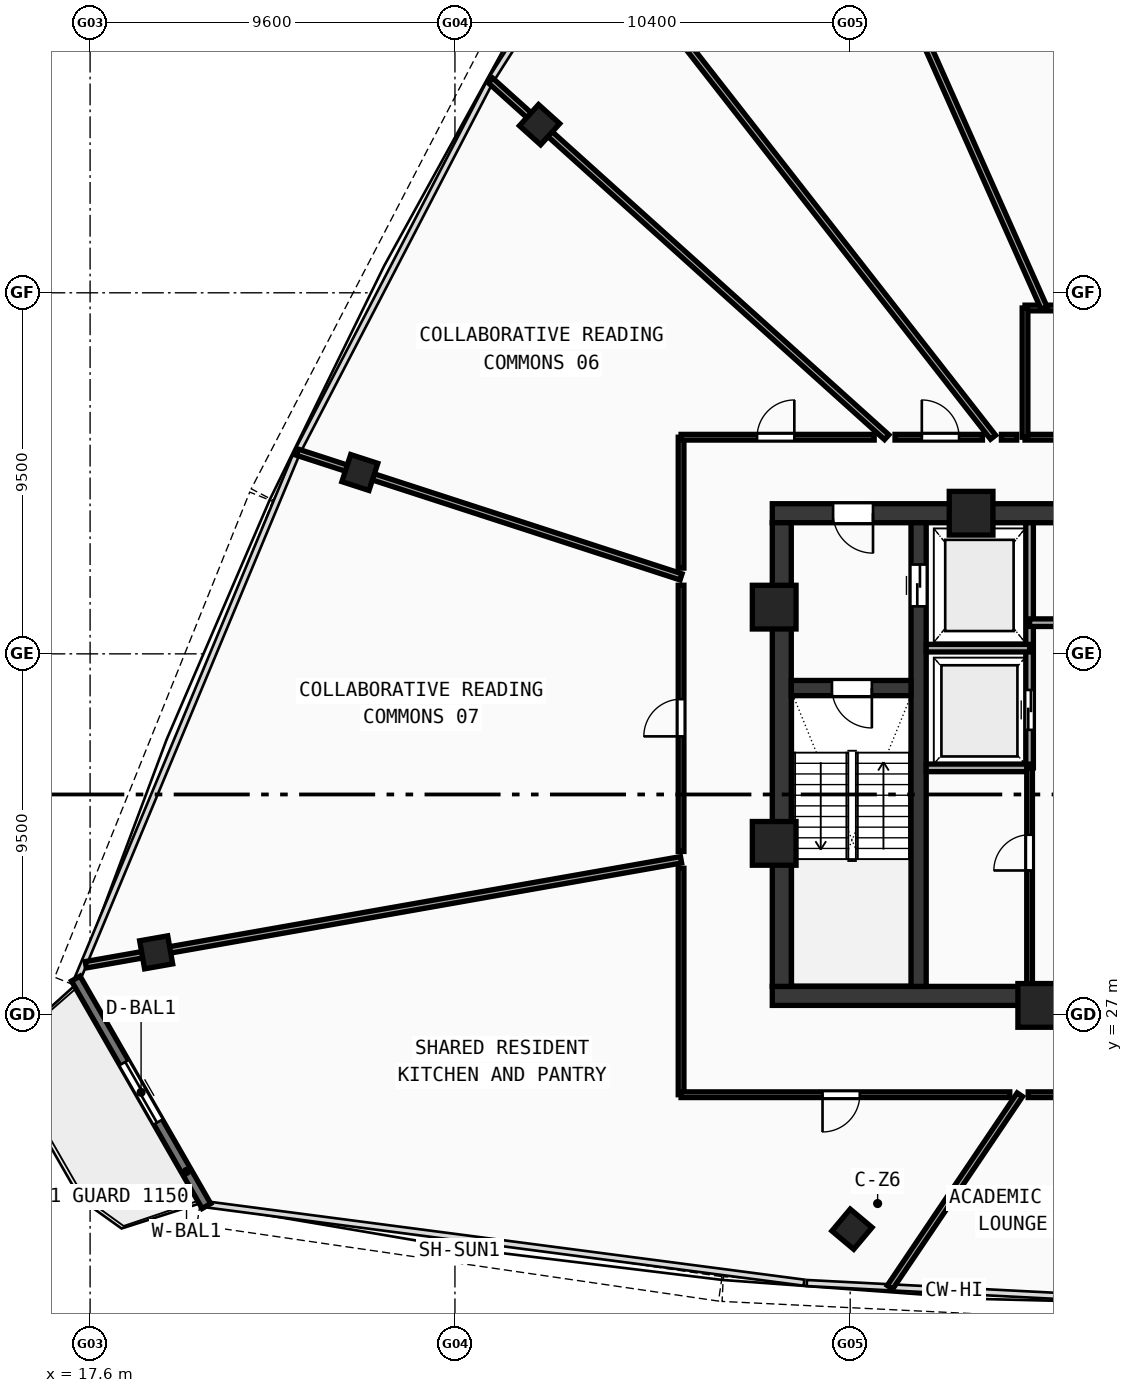
"""IFC4 building model, lengths in metres.
Left out: names, types, materials, properties, quantities, classifications, styles, units other than length and angle.
Written with IfcOpenShell. Run it as: python <this file> out.ifc"""

import sys

from ifc_helpers import new_model, si_unit, direction, frame, frame_2d, origin, origin_with_axes, origin_2d, place, context, subcontext, project, spatial, rectangle, hollow_rectangle, extrude, source, transform, mapped, element, fill, save


model = new_model("IFC4")
c1 = context("Model", 3, precision=1e-05, world=origin(), true_north=direction((0.0, 1.0)))
c2 = subcontext(c1, "Body", "Model", "MODEL_VIEW")
j1 = project(units=[si_unit("LENGTHUNIT", "METRE"), si_unit("PLANEANGLEUNIT", "RADIAN")], contexts=[c1])
p1 = place(None, origin())
s1 = spatial("IfcSite", under=j1, at=p1, CompositionType="ELEMENT")
p2 = place(p1, origin())
s2 = spatial("IfcBuilding", under=s1, at=p2, CompositionType="ELEMENT")
p3 = place(p2, frame((0.0, 0.0, 299.94)))
s3 = spatial("IfcBuildingStorey", under=s2, at=p3, CompositionType="ELEMENT", Elevation=299.94)
p4 = place(p3, frame((35.55, 27.5, 0.0), z_axis=(0.0, 0.0, 1.0), x_axis=(1.0, 0.0, 0.0)))
e1 = element("IfcWall", 1, at=p4, inside=s3, PredefinedType="SHEAR", context=c2, shape_type="SweptSolid", body=[
    extrude(rectangle(XDim=24.9, YDim=0.5, at=frame_2d((12.45, 0.0))), origin(), (0.0, 0.0, 1.0), 3.47),
])
p5 = place(p3, frame((35.55, 40.2, 0.0), z_axis=(0.0, 0.0, 1.0), x_axis=(1.0, 0.0, 0.0)))
e2 = element("IfcWall", 2, at=p5, inside=s3, PredefinedType="SHEAR", context=c2, shape_type="SweptSolid", body=[
    extrude(rectangle(XDim=11.25, YDim=0.5, at=frame_2d((5.625, 0.0))), origin(), (0.0, 0.0, 1.0), 3.47),
])
p6 = place(p5, frame((1.6, 0.0, 0.0)))
e3 = element("IfcOpeningElement", 3, at=p6, cuts=e2, PredefinedType="OPENING", context=c2, shape_type="SweptSolid", body=[
    extrude(rectangle(XDim=1.05, YDim=2.1, at=frame_2d((0.525, 1.05))), frame((0.0, 0.26, 0.0), z_axis=(0.0, -1.0, 0.0), x_axis=(1.0, 0.0, 0.0)), (0.0, 0.0, 1.0), 0.52),
])
p7 = place(p3, frame((35.8, 27.75, 0.0), z_axis=(0.0, 0.0, 1.0), x_axis=(0.0, 1.0, 0.0)))
e4 = element("IfcWall", 4, at=p7, inside=s3, PredefinedType="SHEAR", context=c2, shape_type="SweptSolid", body=[
    extrude(rectangle(XDim=12.2, YDim=0.5, at=frame_2d((6.1, 0.0))), origin(), (0.0, 0.0, 1.0), 3.47),
])
p8 = place(p3, frame((39.4, 27.75, 0.0), z_axis=(0.0, 0.0, 1.0), x_axis=(0.0, 1.0, 0.0)))
e5 = element("IfcWall", 5, at=p8, inside=s3, PredefinedType="SHEAR", context=c2, shape_type="SweptSolid", body=[
    extrude(rectangle(XDim=12.2, YDim=0.4, at=frame_2d((6.1, 0.0))), origin(), (0.0, 0.0, 1.0), 3.47),
])
p9 = place(p8, frame((10.0, 0.0, 0.0)))
e6 = element("IfcOpeningElement", 6, at=p9, cuts=e5, PredefinedType="OPENING", context=c2, shape_type="SweptSolid", body=[
    extrude(rectangle(XDim=1.1, YDim=2.1, at=frame_2d((0.55, 1.05))), frame((0.0, 0.21, 0.0), z_axis=(0.0, -1.0, 0.0), x_axis=(1.0, 0.0, 0.0)), (0.0, 0.0, 1.0), 0.42),
])
p10 = place(p3, frame((36.05, 35.6, 0.0), z_axis=(0.0, 0.0, 1.0), x_axis=(1.0, 0.0, 0.0)))
e7 = element("IfcWall", 7, at=p10, inside=s3, PredefinedType="SHEAR", context=c2, shape_type="SweptSolid", body=[
    extrude(rectangle(XDim=3.15, YDim=0.4, at=frame_2d((1.575, 0.0))), origin(), (0.0, 0.0, 1.0), 3.47),
])
p11 = place(p10, frame((1.07, 0.0, 0.0)))
e8 = element("IfcOpeningElement", 8, at=p11, cuts=e7, PredefinedType="OPENING", context=c2, shape_type="SweptSolid", body=[
    extrude(rectangle(XDim=1.05, YDim=2.1, at=frame_2d((0.525, 1.05))), frame((0.0, 0.21, 0.0), z_axis=(0.0, -1.0, 0.0), x_axis=(1.0, 0.0, 0.0)), (0.0, 0.0, 1.0), 0.42),
])
m1 = source(origin(), c2, "Body", "SweptSolid", [
    extrude(hollow_rectangle(XDim=1.15, YDim=1.15, WallThickness=0.048, at=origin_2d()), origin(), (0.0, 0.0, 1.0), 3.73),
])
for number, where, z_axis, x_axis in (
    (9, (42.588, 27.25, -0.26), (0.0, 0.0, 1.0), (1.0, 0.0, 0.0)),
    (10, (40.781, 40.2, -0.26), (0.0, 0.0, 1.0), (1.0, 0.0, 0.0)),
    (11, (35.6, 37.729, -0.26), (0.0, 0.0, 1.0), (1.0, 0.0, 0.0)),
    (12, (35.6, 31.513, -0.26), (0.0, 0.0, 1.0), (1.0, 0.0, 0.0)),
):
    element("IfcColumn", number, at=place(p3, frame(where, z_axis=z_axis, x_axis=x_axis)), inside=s3, PredefinedType="COLUMN", context=c2, shape_type="MappedRepresentation", body=[
        mapped(m1, transform((0.0, 0.0, 0.0), scale=1.0)),
    ])
m2 = source(origin(), c2, "Body", "SweptSolid", [
    extrude(hollow_rectangle(XDim=0.75, YDim=0.75, WallThickness=0.028, at=origin_2d()), origin(), (0.0, 0.0, 1.0), 3.73),
])
for number, where, z_axis, x_axis in (
    (13, (37.647, 21.362, -0.26), (0.0, 0.0, 1.0), (0.766, -0.643, 0.0)),
    (14, (29.427, 50.424, -0.26), (0.0, 0.0, 1.0), (-0.669, -0.743, 0.0)),
    (15, (24.698, 41.271, -0.26), (0.0, 0.0, 1.0), (-0.309, -0.951, 0.0)),
    (16, (19.338, 28.646, -0.26), (0.0, 0.0, 1.0), (0.174, -0.985, 0.0)),
):
    element("IfcColumn", number, at=place(p3, frame(where, z_axis=z_axis, x_axis=x_axis)), inside=s3, PredefinedType="COLUMN", context=c2, shape_type="MappedRepresentation", body=[
        mapped(m2, transform((0.0, 0.0, 0.0), scale=1.0)),
    ])
p12 = place(p3, frame((17.223, 27.957, 0.0), z_axis=(0.0, 0.0, 1.0), x_axis=(0.49793943781, -0.867211805889, 0.0)))
e17 = element("IfcWall", 17, at=p12, inside=s3, PredefinedType="STANDARD", context=c2, shape_type="SweptSolid", body=[
    extrude(rectangle(XDim=6.903, YDim=0.26, at=frame_2d((3.452, 0.0))), origin(), (0.0, 0.0, 1.0), 3.47),
])
p13 = place(p12, frame((2.552, 0.0, 0.0)))
e18 = element("IfcOpeningElement", 18, at=p13, cuts=e17, PredefinedType="OPENING", context=c2, shape_type="SweptSolid", body=[
    extrude(rectangle(XDim=1.8, YDim=2.15, at=frame_2d((0.9, 1.075))), frame((0.0, 0.14, 0.0), z_axis=(0.0, -1.0, 0.0), x_axis=(1.0, 0.0, 0.0)), (0.0, 0.0, 1.0), 0.28),
])
p14 = place(p3, frame((42.32, 33.5, 0.0), z_axis=(0.0, 0.0, 1.0), x_axis=(0.0, 1.0, 0.0)))
e19 = element("IfcWall", 19, at=p14, inside=s3, PredefinedType="SOLIDWALL", context=c2, shape_type="SweptSolid", body=[
    extrude(rectangle(XDim=6.45, YDim=0.2, at=frame_2d((3.225, 0.0))), origin(), (0.0, 0.0, 1.0), 3.47),
])
p15 = place(p14, frame((1.0, 0.0, 0.0)))
e20 = element("IfcOpeningElement", 20, at=p15, cuts=e19, PredefinedType="OPENING", context=c2, shape_type="SweptSolid", body=[
    extrude(rectangle(XDim=1.05, YDim=2.1, at=frame_2d((0.525, 1.05))), frame((0.0, 0.11, 0.0), z_axis=(0.0, -1.0, 0.0), x_axis=(1.0, 0.0, 0.0)), (0.0, 0.0, 1.0), 0.22),
])
for number, where, z_axis, x_axis in (
    (21, (39.6, 36.65, 0.0), (0.0, 0.0, 1.0), (1.0, 0.0, 0.0)),
    (22, (39.6, 33.5, 0.0), (0.0, 0.0, 1.0), (1.0, 0.0, 0.0)),
):
    element("IfcWall", number, at=place(p3, frame(where, z_axis=z_axis, x_axis=x_axis)), inside=s3, PredefinedType="SOLIDWALL", context=c2, shape_type="SweptSolid", body=[
        extrude(rectangle(XDim=2.72, YDim=0.2, at=frame_2d((1.36, 0.0))), origin(), (0.0, 0.0, 1.0), 3.47),
    ])
p16 = place(p3, frame((42.32, 37.32, 0.0), z_axis=(0.0, 0.0, 1.0), x_axis=(1.0, 0.0, 0.0)))
e23 = element("IfcWall", 23, at=p16, inside=s3, PredefinedType="SOLIDWALL", context=c2, shape_type="SweptSolid", body=[
    extrude(rectangle(XDim=4.73, YDim=0.2, at=frame_2d((2.365, 0.0))), origin(), (0.0, 0.0, 1.0), 3.47),
])
p17 = place(p16, frame((1.8, 0.0, 0.0)))
e24 = element("IfcOpeningElement", 24, at=p17, cuts=e23, PredefinedType="OPENING", context=c2, shape_type="SweptSolid", body=[
    extrude(rectangle(XDim=0.9, YDim=2.1, at=frame_2d((0.45, 1.05))), frame((0.0, 0.11, 0.0), z_axis=(0.0, -1.0, 0.0), x_axis=(1.0, 0.0, 0.0)), (0.0, 0.0, 1.0), 0.22),
])
p18 = place(p3, frame((42.32, 27.6, 0.0), z_axis=(0.0, 0.0, 1.0), x_axis=(0.0, 1.0, 0.0)))
e25 = element("IfcWall", 25, at=p18, inside=s3, PredefinedType="PARTITIONING", context=c2, shape_type="SweptSolid", body=[
    extrude(rectangle(XDim=5.9, YDim=0.15, at=frame_2d((2.95, 0.0))), origin(), (0.0, 0.0, 1.0), 3.47),
])
p19 = place(p18, frame((3.2, 0.0, 0.0)))
e26 = element("IfcOpeningElement", 26, at=p19, cuts=e25, PredefinedType="OPENING", context=c2, shape_type="SweptSolid", body=[
    extrude(rectangle(XDim=0.94, YDim=2.1, at=frame_2d((0.47, 1.05))), frame((0.0, 0.085, 0.0), z_axis=(0.0, -1.0, 0.0), x_axis=(1.0, 0.0, 0.0)), (0.0, 0.0, 1.0), 0.17),
])
p20 = place(p3, frame((42.2, 42.2, 0.0), z_axis=(0.0, 0.0, 1.0), x_axis=(1.0, 0.0, 0.0)))
e27 = element("IfcWall", 27, at=p20, inside=s3, PredefinedType="PARTITIONING", context=c2, shape_type="SweptSolid", body=[
    extrude(rectangle(XDim=5.0, YDim=0.15, at=frame_2d((2.5, 0.0))), origin(), (0.0, 0.0, 1.0), 2.87),
])
p21 = place(p20, frame((1.4, 0.0, 0.0)))
e28 = element("IfcOpeningElement", 28, at=p21, cuts=e27, PredefinedType="OPENING", context=c2, shape_type="SweptSolid", body=[
    extrude(rectangle(XDim=0.92, YDim=2.1, at=frame_2d((0.46, 1.05))), frame((0.0, 0.085, 0.0), z_axis=(0.0, -1.0, 0.0), x_axis=(1.0, 0.0, 0.0)), (0.0, 0.0, 1.0), 0.17),
])
p22 = place(p3, frame((42.2, 45.6, 0.0), z_axis=(0.0, 0.0, 1.0), x_axis=(1.0, 0.0, 0.0)))
e29 = element("IfcWall", 29, at=p22, inside=s3, PredefinedType="PARTITIONING", context=c2, shape_type="SweptSolid", body=[
    extrude(rectangle(XDim=5.0, YDim=0.15, at=frame_2d((2.5, 0.0))), origin(), (0.0, 0.0, 1.0), 2.87),
])
p23 = place(p3, frame((42.2, 42.2, 0.0), z_axis=(0.0, 0.0, 1.0), x_axis=(0.0, 1.0, 0.0)))
e30 = element("IfcWall", 30, at=p23, inside=s3, PredefinedType="PARTITIONING", context=c2, shape_type="SweptSolid", body=[
    extrude(rectangle(XDim=3.4, YDim=0.15, at=frame_2d((1.7, 0.0))), origin(), (0.0, 0.0, 1.0), 3.47),
])
p24 = place(p3, frame((42.702, 45.6, 0.0), z_axis=(0.0, 0.0, 1.0), x_axis=(-0.406747233578, 0.913540742374, 0.0)))
e31 = element("IfcWall", 31, at=p24, inside=s3, PredefinedType="PARTITIONING", context=c2, shape_type="SweptSolid", body=[
    extrude(rectangle(XDim=18.602, YDim=0.17, at=frame_2d((9.301, 0.0))), origin(), (0.0, 0.0, 1.0), 2.87),
])
p25 = place(p3, frame((41.359, 42.2, 0.0), z_axis=(0.0, 0.0, 1.0), x_axis=(-0.615656448173, 0.788014681223, 0.0)))
e32 = element("IfcWall", 32, at=p25, inside=s3, PredefinedType="PARTITIONING", context=c2, shape_type="SweptSolid", body=[
    extrude(rectangle(XDim=17.185, YDim=0.17, at=frame_2d((8.592, 0.0))), origin(), (0.0, 0.0, 1.0), 2.87),
])
p26 = place(p3, frame((38.56, 42.2, 0.0), z_axis=(0.0, 0.0, 1.0), x_axis=(-0.74314439151, 0.669131088329, 0.0)))
e33 = element("IfcWall", 33, at=p26, inside=s3, PredefinedType="PARTITIONING", context=c2, shape_type="SweptSolid", body=[
    extrude(rectangle(XDim=14.026, YDim=0.17, at=frame_2d((7.013, 0.0))), origin(), (0.0, 0.0, 1.0), 2.87),
])
p27 = place(p3, frame((33.15, 38.525, 0.0), z_axis=(0.0, 0.0, 1.0), x_axis=(-0.951060589798, 0.309004457141, 0.0)))
e34 = element("IfcWall", 34, at=p27, inside=s3, PredefinedType="PARTITIONING", context=c2, shape_type="SweptSolid", body=[
    extrude(rectangle(XDim=10.62, YDim=0.17, at=frame_2d((5.31, 0.0))), origin(), (0.0, 0.0, 1.0), 2.87),
])
p28 = place(p3, frame((33.15, 31.082, 0.0), z_axis=(0.0, 0.0, 1.0), x_axis=(-0.984807655248, -0.173648732116, 0.0)))
e35 = element("IfcWall", 35, at=p28, inside=s3, PredefinedType="PARTITIONING", context=c2, shape_type="SweptSolid", body=[
    extrude(rectangle(XDim=15.906, YDim=0.17, at=frame_2d((7.953, 0.0))), origin(), (0.0, 0.0, 1.0), 2.87),
])
p29 = place(p3, frame((42.064, 24.9, 0.0), z_axis=(0.0, 0.0, 1.0), x_axis=(-0.559190191843, -0.829039401564, 0.0)))
e36 = element("IfcWall", 36, at=p29, inside=s3, PredefinedType="PARTITIONING", context=c2, shape_type="SweptSolid", body=[
    extrude(rectangle(XDim=6.112, YDim=0.17, at=frame_2d((3.056, 0.0))), origin(), (0.0, 0.0, 1.0), 2.87),
])
p30 = place(p3, frame((33.15, 24.9, 0.0), z_axis=(0.0, 0.0, 1.0), x_axis=(0.0, 1.0, 0.0)))
e37 = element("IfcWall", 37, at=p30, inside=s3, PredefinedType="PARTITIONING", context=c2, shape_type="SweptSolid", body=[
    extrude(rectangle(XDim=5.958, YDim=0.15, at=frame_2d((2.979, 0.0))), origin(), (0.0, 0.0, 1.0), 3.12),
])
p31 = place(p3, frame((33.15, 31.301, 0.0), z_axis=(0.0, 0.0, 1.0), x_axis=(0.0, 1.0, 0.0)))
e38 = element("IfcWall", 38, at=p31, inside=s3, PredefinedType="PARTITIONING", context=c2, shape_type="SweptSolid", body=[
    extrude(rectangle(XDim=7.004, YDim=0.15, at=frame_2d((3.502, 0.0))), origin(), (0.0, 0.0, 1.0), 3.47),
])
p32 = place(p31, frame((3.027, 0.0, 0.0)))
e39 = element("IfcOpeningElement", 39, at=p32, cuts=e38, PredefinedType="OPENING", context=c2, shape_type="SweptSolid", body=[
    extrude(rectangle(XDim=0.98, YDim=2.12, at=frame_2d((0.49, 1.06))), frame((0.0, 0.085, 0.0), z_axis=(0.0, -1.0, 0.0), x_axis=(1.0, 0.0, 0.0)), (0.0, 0.0, 1.0), 0.17),
])
p33 = place(p3, frame((33.15, 38.756, 0.0), z_axis=(0.0, 0.0, 1.0), x_axis=(0.0, 1.0, 0.0)))
e40 = element("IfcWall", 40, at=p33, inside=s3, PredefinedType="PARTITIONING", context=c2, shape_type="SweptSolid", body=[
    extrude(rectangle(XDim=3.444, YDim=0.15, at=frame_2d((1.722, 0.0))), origin(), (0.0, 0.0, 1.0), 3.12),
])
p34 = place(p3, frame((33.15, 42.2, 0.0), z_axis=(0.0, 0.0, 1.0), x_axis=(1.0, 0.0, 0.0)))
e41 = element("IfcWall", 41, at=p34, inside=s3, PredefinedType="PARTITIONING", context=c2, shape_type="SweptSolid", body=[
    extrude(rectangle(XDim=5.081, YDim=0.15, at=frame_2d((2.541, 0.0))), origin(), (0.0, 0.0, 1.0), 3.12),
])
p35 = place(p34, frame((2.0, 0.0, 0.0)))
e42 = element("IfcOpeningElement", 42, at=p35, cuts=e41, PredefinedType="OPENING", context=c2, shape_type="SweptSolid", body=[
    extrude(rectangle(XDim=0.98, YDim=2.12, at=frame_2d((0.49, 1.06))), frame((0.0, 0.085, 0.0), z_axis=(0.0, -1.0, 0.0), x_axis=(1.0, 0.0, 0.0)), (0.0, 0.0, 1.0), 0.17),
])
p36 = place(p3, frame((38.78, 42.2, 0.0), z_axis=(0.0, 0.0, 1.0), x_axis=(1.0, 0.0, 0.0)))
e43 = element("IfcWall", 43, at=p36, inside=s3, PredefinedType="PARTITIONING", context=c2, shape_type="SweptSolid", body=[
    extrude(rectangle(XDim=2.3, YDim=0.15, at=frame_2d((1.15, 0.0))), origin(), (0.0, 0.0, 1.0), 2.87),
])
p37 = place(p36, frame((0.705, 0.0, 0.0)))
e44 = element("IfcOpeningElement", 44, at=p37, cuts=e43, PredefinedType="OPENING", context=c2, shape_type="SweptSolid", body=[
    extrude(rectangle(XDim=0.98, YDim=2.12, at=frame_2d((0.49, 1.06))), frame((0.0, 0.085, 0.0), z_axis=(0.0, -1.0, 0.0), x_axis=(1.0, 0.0, 0.0)), (0.0, 0.0, 1.0), 0.17),
])
p38 = place(p3, frame((41.579, 42.2, 0.0), z_axis=(0.0, 0.0, 1.0), x_axis=(1.0, 0.0, 0.0)))
e45 = element("IfcWall", 45, at=p38, inside=s3, PredefinedType="PARTITIONING", context=c2, shape_type="SweptSolid", body=[
    extrude(rectangle(XDim=0.401, YDim=0.15, at=frame_2d((0.201, 0.0))), origin(), (0.0, 0.0, 1.0), 3.47),
])
p39 = place(p3, frame((45.414, 24.9, 0.0), z_axis=(0.0, 0.0, 1.0), x_axis=(-1.0, 0.0, 0.0)))
e46 = element("IfcWall", 46, at=p39, inside=s3, PredefinedType="PARTITIONING", context=c2, shape_type="SweptSolid", body=[
    extrude(rectangle(XDim=3.13, YDim=0.15, at=frame_2d((1.565, 0.0))), origin(), (0.0, 0.0, 1.0), 3.47),
])
p40 = place(p39, frame((1.101, 0.0, 0.0)))
e47 = element("IfcOpeningElement", 47, at=p40, cuts=e46, PredefinedType="OPENING", context=c2, shape_type="SweptSolid", body=[
    extrude(rectangle(XDim=0.9, YDim=2.08, at=frame_2d((0.45, 1.04))), frame((0.0, 0.085, 0.0), z_axis=(0.0, -1.0, 0.0), x_axis=(1.0, 0.0, 0.0)), (0.0, 0.0, 1.0), 0.17),
])
p41 = place(p3, frame((41.799, 24.9, 0.0), z_axis=(0.0, 0.0, 1.0), x_axis=(-1.0, 0.0, 0.0)))
e48 = element("IfcWall", 48, at=p41, inside=s3, PredefinedType="PARTITIONING", context=c2, shape_type="SweptSolid", body=[
    extrude(rectangle(XDim=8.649, YDim=0.15, at=frame_2d((4.324, 0.0))), origin(), (0.0, 0.0, 1.0), 2.87),
])
p42 = place(p41, frame((3.947, 0.0, 0.0)))
e49 = element("IfcOpeningElement", 49, at=p42, cuts=e48, PredefinedType="OPENING", context=c2, shape_type="SweptSolid", body=[
    extrude(rectangle(XDim=0.98, YDim=2.12, at=frame_2d((0.49, 1.06))), frame((0.0, 0.085, 0.0), z_axis=(0.0, -1.0, 0.0), x_axis=(1.0, 0.0, 0.0)), (0.0, 0.0, 1.0), 0.17),
])
m3 = source(origin(), c2, "Body", "SweptSolid", [
    extrude(rectangle(XDim=1.8, YDim=2.15, at=frame_2d((0.9, 1.075))), frame((0.0, 0.025, 0.0), z_axis=(0.0, -1.0, 0.0), x_axis=(1.0, 0.0, 0.0)), (0.0, 0.0, 1.0), 0.05),
])
p43 = place(p13, origin_with_axes())
e50 = element("IfcDoor", 50, at=p43, inside=s3, OperationType="DOUBLE_DOOR_SLIDING", PredefinedType="DOOR", context=c2, shape_type="MappedRepresentation", body=[
    mapped(m3, transform((0.0, 0.0, 0.0), scale=1.0)),
])
fill(e18, e50)
m4 = source(origin(), c2, "Body", "SweptSolid", [
    extrude(rectangle(XDim=1.05, YDim=2.1, at=frame_2d((0.525, 1.05))), frame((0.0, 0.025, 0.0), z_axis=(0.0, -1.0, 0.0), x_axis=(1.0, 0.0, 0.0)), (0.0, 0.0, 1.0), 0.05),
])
p44 = place(p11, frame((1.05, 0.0, 0.0), z_axis=(0.0, 0.0, 1.0), x_axis=(-1.0, 0.0, 0.0)))
e51 = element("IfcDoor", 51, at=p44, inside=s3, OperationType="SINGLE_SWING_LEFT", PredefinedType="DOOR", context=c2, shape_type="MappedRepresentation", body=[
    mapped(m4, transform((0.0, 0.0, 0.0), scale=1.0)),
])
fill(e8, e51)
p45 = place(p6, frame((1.05, 0.0, 0.0), z_axis=(0.0, 0.0, 1.0), x_axis=(-1.0, 0.0, 0.0)))
e52 = element("IfcDoor", 52, at=p45, inside=s3, OperationType="SINGLE_SWING_LEFT", PredefinedType="DOOR", context=c2, shape_type="MappedRepresentation", body=[
    mapped(m4, transform((0.0, 0.0, 0.0), scale=1.0)),
])
fill(e3, e52)
m5 = source(origin(), c2, "Body", "SweptSolid", [
    extrude(rectangle(XDim=1.1, YDim=2.1, at=frame_2d((0.55, 1.05))), frame((0.0, 0.025, 0.0), z_axis=(0.0, -1.0, 0.0), x_axis=(1.0, 0.0, 0.0)), (0.0, 0.0, 1.0), 0.05),
])
p46 = place(p9, frame((1.1, 0.0, 0.0), z_axis=(0.0, 0.0, 1.0), x_axis=(-1.0, 0.0, 0.0)))
e53 = element("IfcDoor", 53, at=p46, inside=s3, OperationType="DOUBLE_DOOR_SLIDING", PredefinedType="DOOR", context=c2, shape_type="MappedRepresentation", body=[
    mapped(m5, transform((0.0, 0.0, 0.0), scale=1.0)),
])
fill(e6, e53)
p47 = place(p15, origin_with_axes())
e54 = element("IfcDoor", 54, at=p47, inside=s3, OperationType="DOUBLE_DOOR_SLIDING", PredefinedType="DOOR", context=c2, shape_type="MappedRepresentation", body=[
    mapped(m4, transform((0.0, 0.0, 0.0), scale=1.0)),
])
fill(e20, e54)
m6 = source(origin(), c2, "Body", "SweptSolid", [
    extrude(rectangle(XDim=0.94, YDim=2.1, at=frame_2d((0.47, 1.05))), frame((0.0, 0.025, 0.0), z_axis=(0.0, -1.0, 0.0), x_axis=(1.0, 0.0, 0.0)), (0.0, 0.0, 1.0), 0.05),
])
p48 = place(p19, origin_with_axes())
e55 = element("IfcDoor", 55, at=p48, inside=s3, OperationType="SINGLE_SWING_LEFT", PredefinedType="DOOR", context=c2, shape_type="MappedRepresentation", body=[
    mapped(m6, transform((0.0, 0.0, 0.0), scale=1.0)),
])
fill(e26, e55)
m7 = source(origin(), c2, "Body", "SweptSolid", [
    extrude(rectangle(XDim=0.98, YDim=2.12, at=frame_2d((0.49, 1.06))), frame((0.0, 0.025, 0.0), z_axis=(0.0, -1.0, 0.0), x_axis=(1.0, 0.0, 0.0)), (0.0, 0.0, 1.0), 0.05),
])
p49 = place(p37, origin_with_axes())
e56 = element("IfcDoor", 56, at=p49, inside=s3, OperationType="SINGLE_SWING_LEFT", PredefinedType="DOOR", context=c2, shape_type="MappedRepresentation", body=[
    mapped(m7, transform((0.0, 0.0, 0.0), scale=1.0)),
])
fill(e44, e56)
p50 = place(p35, origin_with_axes())
e57 = element("IfcDoor", 57, at=p50, inside=s3, OperationType="SINGLE_SWING_RIGHT", PredefinedType="DOOR", context=c2, shape_type="MappedRepresentation", body=[
    mapped(m7, transform((0.0, 0.0, 0.0), scale=1.0)),
])
fill(e42, e57)
p51 = place(p32, origin_with_axes())
e58 = element("IfcDoor", 58, at=p51, inside=s3, OperationType="SINGLE_SWING_LEFT", PredefinedType="DOOR", context=c2, shape_type="MappedRepresentation", body=[
    mapped(m7, transform((0.0, 0.0, 0.0), scale=1.0)),
])
fill(e39, e58)
p52 = place(p42, origin_with_axes())
e59 = element("IfcDoor", 59, at=p52, inside=s3, OperationType="SINGLE_SWING_RIGHT", PredefinedType="DOOR", context=c2, shape_type="MappedRepresentation", body=[
    mapped(m7, transform((0.0, 0.0, 0.0), scale=1.0)),
])
fill(e49, e59)
save(model, sys.argv[1])
